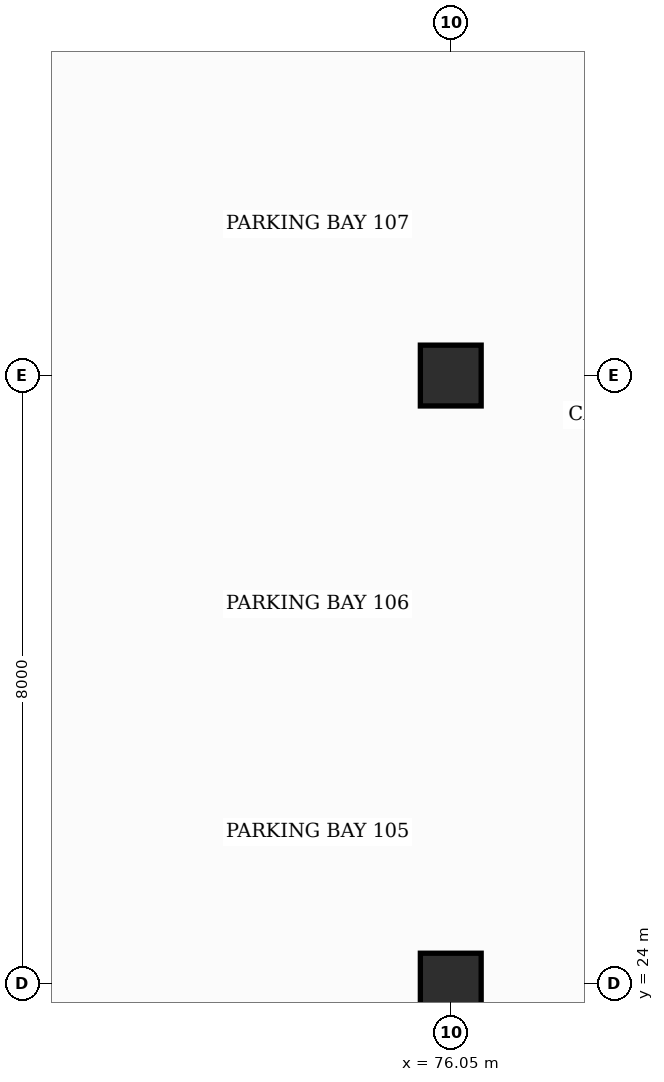
"""IFC4 building model, lengths in metres.
Left out: names, types, materials, properties, quantities, classifications, styles, units other than length and angle.
Written with IfcOpenShell. Run it as: python <this file> out.ifc"""

import sys

from ifc_helpers import new_model, si_unit, direction, frame, origin, origin_2d, place, context, subcontext, project, spatial, hollow_rectangle, extrude, element, save


model = new_model("IFC4")
c1 = context("Model", 3, precision=1e-05, world=origin(), true_north=direction((0.0, 1.0)))
c2 = subcontext(c1, "Body", "Model", "MODEL_VIEW")
j1 = project(units=[si_unit("LENGTHUNIT", "METRE"), si_unit("PLANEANGLEUNIT", "RADIAN")], contexts=[c1])
p1 = place(None, origin())
s1 = spatial("IfcSite", under=j1, at=p1, CompositionType="ELEMENT")
p2 = place(p1, origin())
s2 = spatial("IfcBuilding", under=s1, at=p2, CompositionType="ELEMENT")
p3 = place(p2, frame((0.0, 0.0, -5.4)))
s3 = spatial("IfcBuildingStorey", under=s2, at=p3, CompositionType="ELEMENT", Elevation=-5.4)
for number, where, z_axis, x_axis in (
    (1, (76.05, 24.0, 0.0), (0.0, 0.0, 1.0), (1.0, 0.0, 0.0)),
    (2, (76.05, 32.0, 0.0), (0.0, 0.0, 1.0), (1.0, 0.0, 0.0)),
):
    element("IfcColumn", number, at=place(p3, frame(where, z_axis=z_axis, x_axis=x_axis)), inside=s3, PredefinedType="COLUMN", context=c2, shape_type="SweptSolid", body=[
        extrude(hollow_rectangle(XDim=0.8, YDim=0.8, WallThickness=0.032, InnerFilletRadius=0.032, OuterFilletRadius=0.064, at=origin_2d()), origin(), (0.0, 0.0, 1.0), 5.4),
    ])
save(model, sys.argv[1])
